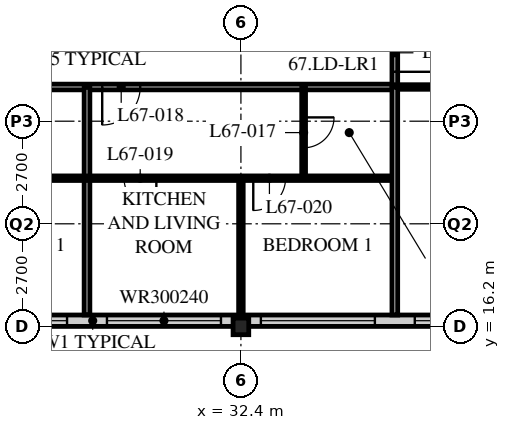
"""IFC4 building model, lengths in metres.
Left out: names, types, materials, properties, quantities, classifications, styles, units other than length and angle.
Written with IfcOpenShell. Run it as: python <this file> out.ifc"""

import sys

from ifc_helpers import new_model, si_unit, direction, frame, frame_2d, origin, origin_2d, place, context, subcontext, project, spatial, rectangle, i_section, extrude, element, fill, save


model = new_model("IFC4")
c1 = context("Model", 3, precision=1e-05, world=origin(), true_north=direction((0.0, 1.0)))
c2 = subcontext(c1, "Body", "Model", "MODEL_VIEW")
j1 = project(units=[si_unit("LENGTHUNIT", "METRE"), si_unit("PLANEANGLEUNIT", "RADIAN")], contexts=[c1])
p1 = place(None, origin())
s1 = spatial("IfcSite", under=j1, at=p1, CompositionType="ELEMENT")
p2 = place(p1, origin())
s2 = spatial("IfcBuilding", under=s1, at=p2, CompositionType="ELEMENT")
p3 = place(p2, frame((0.0, 0.0, 261.9)))
s3 = spatial("IfcBuildingStorey", under=s2, at=p3, CompositionType="ELEMENT", Elevation=261.9)
p4 = place(p3, frame((32.4, 16.2, 0.0), z_axis=(0.0, 0.0, 1.0), x_axis=(1.0, 0.0, 0.0)))
e1 = element("IfcColumn", 1, at=p4, inside=s3, PredefinedType="COLUMN", context=c2, shape_type="SweptSolid", body=[
    extrude(i_section(OverallWidth=0.412, OverallDepth=0.437, WebThickness=0.036, FlangeThickness=0.058, FilletRadius=0.015, at=origin_2d()), origin(), (0.0, 0.0, 1.0), 3.9),
])
p5 = place(p3, frame((8.4, 16.35, 0.0), z_axis=(0.0, 0.0, 1.0), x_axis=(1.0, 0.0, 0.0)))
e2 = element("IfcWall", 2, at=p5, inside=s3, PredefinedType="SOLIDWALL", context=c2, shape_type="SweptSolid", body=[
    extrude(rectangle(XDim=40.2, YDim=0.3, at=frame_2d((20.1, 0.0))), origin(), (0.0, 0.0, 1.0), 3.69),
])
p6 = place(p5, frame((0.225, 0.0, 0.6)))
e3 = element("IfcOpeningElement", 3, at=p6, cuts=e2, PredefinedType="OPENING", context=c2, shape_type="SweptSolid", body=[
    extrude(rectangle(XDim=3.0, YDim=2.4, at=frame_2d((1.5, 1.2))), frame((0.0, 0.16, 0.0), z_axis=(0.0, -1.0, 0.0), x_axis=(1.0, 0.0, 0.0)), (0.0, 0.0, 1.0), 0.32),
])
p7 = place(p5, frame((4.275, 0.0, 0.6)))
e4 = element("IfcOpeningElement", 4, at=p7, cuts=e2, PredefinedType="OPENING", context=c2, shape_type="SweptSolid", body=[
    extrude(rectangle(XDim=3.0, YDim=2.4, at=frame_2d((1.5, 1.2))), frame((0.0, 0.16, 0.0), z_axis=(0.0, -1.0, 0.0), x_axis=(1.0, 0.0, 0.0)), (0.0, 0.0, 1.0), 0.32),
])
p8 = place(p5, frame((8.325, 0.0, 0.6)))
e5 = element("IfcOpeningElement", 5, at=p8, cuts=e2, PredefinedType="OPENING", context=c2, shape_type="SweptSolid", body=[
    extrude(rectangle(XDim=3.0, YDim=2.4, at=frame_2d((1.5, 1.2))), frame((0.0, 0.16, 0.0), z_axis=(0.0, -1.0, 0.0), x_axis=(1.0, 0.0, 0.0)), (0.0, 0.0, 1.0), 0.32),
])
p9 = place(p5, frame((12.375, 0.0, 0.6)))
e6 = element("IfcOpeningElement", 6, at=p9, cuts=e2, PredefinedType="OPENING", context=c2, shape_type="SweptSolid", body=[
    extrude(rectangle(XDim=3.0, YDim=2.4, at=frame_2d((1.5, 1.2))), frame((0.0, 0.16, 0.0), z_axis=(0.0, -1.0, 0.0), x_axis=(1.0, 0.0, 0.0)), (0.0, 0.0, 1.0), 0.32),
])
p10 = place(p5, frame((16.425, 0.0, 0.6)))
e7 = element("IfcOpeningElement", 7, at=p10, cuts=e2, PredefinedType="OPENING", context=c2, shape_type="SweptSolid", body=[
    extrude(rectangle(XDim=3.0, YDim=2.4, at=frame_2d((1.5, 1.2))), frame((0.0, 0.16, 0.0), z_axis=(0.0, -1.0, 0.0), x_axis=(1.0, 0.0, 0.0)), (0.0, 0.0, 1.0), 0.32),
])
p11 = place(p5, frame((20.475, 0.0, 0.6)))
e8 = element("IfcOpeningElement", 8, at=p11, cuts=e2, PredefinedType="OPENING", context=c2, shape_type="SweptSolid", body=[
    extrude(rectangle(XDim=3.0, YDim=2.4, at=frame_2d((1.5, 1.2))), frame((0.0, 0.16, 0.0), z_axis=(0.0, -1.0, 0.0), x_axis=(1.0, 0.0, 0.0)), (0.0, 0.0, 1.0), 0.32),
])
p12 = place(p5, frame((24.525, 0.0, 0.6)))
e9 = element("IfcOpeningElement", 9, at=p12, cuts=e2, PredefinedType="OPENING", context=c2, shape_type="SweptSolid", body=[
    extrude(rectangle(XDim=3.0, YDim=2.4, at=frame_2d((1.5, 1.2))), frame((0.0, 0.16, 0.0), z_axis=(0.0, -1.0, 0.0), x_axis=(1.0, 0.0, 0.0)), (0.0, 0.0, 1.0), 0.32),
])
p13 = place(p5, frame((28.575, 0.0, 0.6)))
e10 = element("IfcOpeningElement", 10, at=p13, cuts=e2, PredefinedType="OPENING", context=c2, shape_type="SweptSolid", body=[
    extrude(rectangle(XDim=3.0, YDim=2.4, at=frame_2d((1.5, 1.2))), frame((0.0, 0.16, 0.0), z_axis=(0.0, -1.0, 0.0), x_axis=(1.0, 0.0, 0.0)), (0.0, 0.0, 1.0), 0.32),
])
p14 = place(p5, frame((32.625, 0.0, 0.6)))
e11 = element("IfcOpeningElement", 11, at=p14, cuts=e2, PredefinedType="OPENING", context=c2, shape_type="SweptSolid", body=[
    extrude(rectangle(XDim=3.0, YDim=2.4, at=frame_2d((1.5, 1.2))), frame((0.0, 0.16, 0.0), z_axis=(0.0, -1.0, 0.0), x_axis=(1.0, 0.0, 0.0)), (0.0, 0.0, 1.0), 0.32),
])
p15 = place(p5, frame((36.675, 0.0, 0.6)))
e12 = element("IfcOpeningElement", 12, at=p15, cuts=e2, PredefinedType="OPENING", context=c2, shape_type="SweptSolid", body=[
    extrude(rectangle(XDim=3.0, YDim=2.4, at=frame_2d((1.5, 1.2))), frame((0.0, 0.16, 0.0), z_axis=(0.0, -1.0, 0.0), x_axis=(1.0, 0.0, 0.0)), (0.0, 0.0, 1.0), 0.32),
])
p16 = place(p3, frame((8.1, 22.5, 0.0), z_axis=(0.0, 0.0, 1.0), x_axis=(1.0, 0.0, 0.0)))
e13 = element("IfcWall", 13, at=p16, inside=s3, PredefinedType="PARTITIONING", context=c2, shape_type="SweptSolid", body=[
    extrude(rectangle(XDim=28.35, YDim=0.15, at=frame_2d((14.175, 0.0))), origin(), (0.0, 0.0, 1.0), 3.69),
])
p17 = place(p16, frame((4.45, 0.0, 0.0)))
e14 = element("IfcOpeningElement", 14, at=p17, cuts=e13, PredefinedType="OPENING", context=c2, shape_type="SweptSolid", body=[
    extrude(rectangle(XDim=1.0, YDim=2.1, at=frame_2d((0.5, 1.05))), frame((0.0, 0.085, 0.0), z_axis=(0.0, -1.0, 0.0), x_axis=(1.0, 0.0, 0.0)), (0.0, 0.0, 1.0), 0.17),
])
p18 = place(p16, frame((12.55, 0.0, 0.0)))
e15 = element("IfcOpeningElement", 15, at=p18, cuts=e13, PredefinedType="OPENING", context=c2, shape_type="SweptSolid", body=[
    extrude(rectangle(XDim=1.0, YDim=2.1, at=frame_2d((0.5, 1.05))), frame((0.0, 0.085, 0.0), z_axis=(0.0, -1.0, 0.0), x_axis=(1.0, 0.0, 0.0)), (0.0, 0.0, 1.0), 0.17),
])
p19 = place(p16, frame((20.65, 0.0, 0.0)))
e16 = element("IfcOpeningElement", 16, at=p19, cuts=e13, PredefinedType="OPENING", context=c2, shape_type="SweptSolid", body=[
    extrude(rectangle(XDim=1.0, YDim=2.1, at=frame_2d((0.5, 1.05))), frame((0.0, 0.085, 0.0), z_axis=(0.0, -1.0, 0.0), x_axis=(1.0, 0.0, 0.0)), (0.0, 0.0, 1.0), 0.17),
])
p20 = place(p16, frame((2.625, 0.0, 0.0)))
e17 = element("IfcOpeningElement", 17, at=p20, cuts=e13, PredefinedType="OPENING", context=c2, shape_type="SweptSolid", body=[
    extrude(rectangle(XDim=1.0, YDim=2.1, at=frame_2d((0.5, 1.05))), frame((0.0, 0.085, 0.0), z_axis=(0.0, -1.0, 0.0), x_axis=(1.0, 0.0, 0.0)), (0.0, 0.0, 1.0), 0.17),
])
p21 = place(p3, frame((36.45, 22.5, 0.0), z_axis=(0.0, 0.0, 1.0), x_axis=(0.0, 1.0, 0.0)))
e18 = element("IfcWall", 18, at=p21, inside=s3, PredefinedType="PARTITIONING", context=c2, shape_type="SweptSolid", body=[
    extrude(rectangle(XDim=1.8, YDim=0.15, at=frame_2d((0.9, 0.0))), origin(), (0.0, 0.0, 1.0), 3.69),
])
p22 = place(p21, frame((0.4, 0.0, 0.0)))
e19 = element("IfcOpeningElement", 19, at=p22, cuts=e18, PredefinedType="OPENING", context=c2, shape_type="SweptSolid", body=[
    extrude(rectangle(XDim=1.0, YDim=2.1, at=frame_2d((0.5, 1.05))), frame((0.0, 0.085, 0.0), z_axis=(0.0, -1.0, 0.0), x_axis=(1.0, 0.0, 0.0)), (0.0, 0.0, 1.0), 0.17),
])
p23 = place(p3, frame((28.35, 22.5, 0.0), z_axis=(0.0, 0.0, 1.0), x_axis=(0.0, -1.0, 0.0)))
e20 = element("IfcWall", 20, at=p23, inside=s3, PredefinedType="PARTITIONING", context=c2, shape_type="SweptSolid", body=[
    extrude(rectangle(XDim=6.0, YDim=0.15, at=frame_2d((3.0, 0.0))), origin(), (0.0, 0.0, 1.0), 3.69),
])
p24 = place(p3, frame((34.05, 22.5, 0.0), z_axis=(0.0, 0.0, 1.0), x_axis=(0.0, -1.0, 0.0)))
e21 = element("IfcWall", 21, at=p24, inside=s3, PredefinedType="PARTITIONING", context=c2, shape_type="SweptSolid", body=[
    extrude(rectangle(XDim=2.4, YDim=0.1, at=frame_2d((1.2, 0.0))), origin(), (0.0, 0.0, 1.0), 3.69),
])
p25 = place(p24, frame((0.8, 0.0, 0.0)))
e22 = element("IfcOpeningElement", 22, at=p25, cuts=e21, PredefinedType="OPENING", context=c2, shape_type="SweptSolid", body=[
    extrude(rectangle(XDim=0.8, YDim=2.1, at=frame_2d((0.4, 1.05))), frame((0.0, 0.06, 0.0), z_axis=(0.0, -1.0, 0.0), x_axis=(1.0, 0.0, 0.0)), (0.0, 0.0, 1.0), 0.12),
])
p26 = place(p3, frame((32.4, 20.1, 0.0), z_axis=(0.0, 0.0, 1.0), x_axis=(0.0, -1.0, 0.0)))
e23 = element("IfcWall", 23, at=p26, inside=s3, PredefinedType="PARTITIONING", context=c2, shape_type="SweptSolid", body=[
    extrude(rectangle(XDim=3.6, YDim=0.12, at=frame_2d((1.8, 0.0))), origin(), (0.0, 0.0, 1.0), 3.078),
])
p27 = place(p3, frame((8.1, 20.1, 0.0), z_axis=(0.0, 0.0, 1.0), x_axis=(1.0, 0.0, 0.0)))
e24 = element("IfcWall", 24, at=p27, inside=s3, PredefinedType="PARTITIONING", context=c2, shape_type="SweptSolid", body=[
    extrude(rectangle(XDim=28.35, YDim=0.12, at=frame_2d((14.175, 0.0))), origin(), (0.0, 0.0, 1.0), 3.69),
])
p28 = place(p27, frame((5.025, 0.0, 0.0)))
e25 = element("IfcOpeningElement", 25, at=p28, cuts=e24, PredefinedType="OPENING", context=c2, shape_type="SweptSolid", body=[
    extrude(rectangle(XDim=0.85, YDim=2.1, at=frame_2d((0.425, 1.05))), frame((0.0, 0.07, 0.0), z_axis=(0.0, -1.0, 0.0), x_axis=(1.0, 0.0, 0.0)), (0.0, 0.0, 1.0), 0.14),
])
p29 = place(p27, frame((8.425, 0.0, 0.0)))
e26 = element("IfcOpeningElement", 26, at=p29, cuts=e24, PredefinedType="OPENING", context=c2, shape_type="SweptSolid", body=[
    extrude(rectangle(XDim=0.85, YDim=2.1, at=frame_2d((0.425, 1.05))), frame((0.0, 0.07, 0.0), z_axis=(0.0, -1.0, 0.0), x_axis=(1.0, 0.0, 0.0)), (0.0, 0.0, 1.0), 0.14),
])
p30 = place(p27, frame((13.125, 0.0, 0.0)))
e27 = element("IfcOpeningElement", 27, at=p30, cuts=e24, PredefinedType="OPENING", context=c2, shape_type="SweptSolid", body=[
    extrude(rectangle(XDim=0.85, YDim=2.1, at=frame_2d((0.425, 1.05))), frame((0.0, 0.07, 0.0), z_axis=(0.0, -1.0, 0.0), x_axis=(1.0, 0.0, 0.0)), (0.0, 0.0, 1.0), 0.14),
])
p31 = place(p27, frame((16.525, 0.0, 0.0)))
e28 = element("IfcOpeningElement", 28, at=p31, cuts=e24, PredefinedType="OPENING", context=c2, shape_type="SweptSolid", body=[
    extrude(rectangle(XDim=0.85, YDim=2.1, at=frame_2d((0.425, 1.05))), frame((0.0, 0.07, 0.0), z_axis=(0.0, -1.0, 0.0), x_axis=(1.0, 0.0, 0.0)), (0.0, 0.0, 1.0), 0.14),
])
p32 = place(p27, frame((21.225, 0.0, 0.0)))
e29 = element("IfcOpeningElement", 29, at=p32, cuts=e24, PredefinedType="OPENING", context=c2, shape_type="SweptSolid", body=[
    extrude(rectangle(XDim=0.85, YDim=2.1, at=frame_2d((0.425, 1.05))), frame((0.0, 0.07, 0.0), z_axis=(0.0, -1.0, 0.0), x_axis=(1.0, 0.0, 0.0)), (0.0, 0.0, 1.0), 0.14),
])
p33 = place(p27, frame((24.625, 0.0, 0.0)))
e30 = element("IfcOpeningElement", 30, at=p33, cuts=e24, PredefinedType="OPENING", context=c2, shape_type="SweptSolid", body=[
    extrude(rectangle(XDim=0.85, YDim=2.1, at=frame_2d((0.425, 1.05))), frame((0.0, 0.07, 0.0), z_axis=(0.0, -1.0, 0.0), x_axis=(1.0, 0.0, 0.0)), (0.0, 0.0, 1.0), 0.14),
])
p34 = place(p27, frame((2.725, 0.0, 0.0)))
e31 = element("IfcOpeningElement", 31, at=p34, cuts=e24, PredefinedType="OPENING", context=c2, shape_type="SweptSolid", body=[
    extrude(rectangle(XDim=0.85, YDim=2.1, at=frame_2d((0.425, 1.05))), frame((0.0, 0.07, 0.0), z_axis=(0.0, -1.0, 0.0), x_axis=(1.0, 0.0, 0.0)), (0.0, 0.0, 1.0), 0.14),
])
p35 = place(p3, frame((36.45, 22.5, 0.0), z_axis=(0.0, 0.0, 1.0), x_axis=(1.0, 0.0, 0.0)))
e32 = element("IfcWall", 32, at=p35, inside=s3, PredefinedType="PARTITIONING", context=c2, shape_type="SweptSolid", body=[
    extrude(rectangle(XDim=6.45, YDim=0.12, at=frame_2d((3.225, 0.0))), origin(), (0.0, 0.0, 1.0), 3.69),
])
p36 = place(p35, frame((2.8, 0.0, 0.0)))
e33 = element("IfcOpeningElement", 33, at=p36, cuts=e32, PredefinedType="OPENING", context=c2, shape_type="SweptSolid", body=[
    extrude(rectangle(XDim=0.85, YDim=2.1, at=frame_2d((0.425, 1.05))), frame((0.0, 0.07, 0.0), z_axis=(0.0, -1.0, 0.0), x_axis=(1.0, 0.0, 0.0)), (0.0, 0.0, 1.0), 0.14),
])
p37 = place(p3, frame((36.45, 16.5, 0.0), z_axis=(0.0, 0.0, 1.0), x_axis=(0.0, 1.0, 0.0)))
e34 = element("IfcWall", 34, at=p37, inside=s3, PredefinedType="PARTITIONING", context=c2, shape_type="SweptSolid", body=[
    extrude(rectangle(XDim=6.0, YDim=0.15, at=frame_2d((3.0, 0.0))), origin(), (0.0, 0.0, 1.0), 3.69),
])
p38 = place(p10, origin())
e35 = element("IfcWindow", 35, at=p38, inside=s3, PartitioningType="SINGLE_PANEL", PredefinedType="WINDOW", context=c2, shape_type="SweptSolid", body=[
    extrude(rectangle(XDim=3.0, YDim=2.4, at=frame_2d((1.5, 1.2))), frame((0.0, 0.03, 0.0), z_axis=(0.0, -1.0, 0.0), x_axis=(1.0, 0.0, 0.0)), (0.0, 0.0, 1.0), 0.06),
])
fill(e7, e35)
p39 = place(p11, origin())
e36 = element("IfcWindow", 36, at=p39, inside=s3, PartitioningType="SINGLE_PANEL", PredefinedType="WINDOW", context=c2, shape_type="SweptSolid", body=[
    extrude(rectangle(XDim=3.0, YDim=2.4, at=frame_2d((1.5, 1.2))), frame((0.0, 0.03, 0.0), z_axis=(0.0, -1.0, 0.0), x_axis=(1.0, 0.0, 0.0)), (0.0, 0.0, 1.0), 0.06),
])
fill(e8, e36)
p40 = place(p12, origin())
e37 = element("IfcWindow", 37, at=p40, inside=s3, PartitioningType="SINGLE_PANEL", PredefinedType="WINDOW", context=c2, shape_type="SweptSolid", body=[
    extrude(rectangle(XDim=3.0, YDim=2.4, at=frame_2d((1.5, 1.2))), frame((0.0, 0.03, 0.0), z_axis=(0.0, -1.0, 0.0), x_axis=(1.0, 0.0, 0.0)), (0.0, 0.0, 1.0), 0.06),
])
fill(e9, e37)
p41 = place(p13, origin())
e38 = element("IfcWindow", 38, at=p41, inside=s3, PartitioningType="SINGLE_PANEL", PredefinedType="WINDOW", context=c2, shape_type="SweptSolid", body=[
    extrude(rectangle(XDim=3.0, YDim=2.4, at=frame_2d((1.5, 1.2))), frame((0.0, 0.03, 0.0), z_axis=(0.0, -1.0, 0.0), x_axis=(1.0, 0.0, 0.0)), (0.0, 0.0, 1.0), 0.06),
])
fill(e10, e38)
p42 = place(p25, origin())
e39 = element("IfcDoor", 39, at=p42, inside=s3, OperationType="SINGLE_SWING_LEFT", PredefinedType="DOOR", context=c2, shape_type="SweptSolid", body=[
    extrude(rectangle(XDim=0.8, YDim=2.1, at=frame_2d((0.4, 1.05))), frame((0.0, 0.025, 0.0), z_axis=(0.0, -1.0, 0.0), x_axis=(1.0, 0.0, 0.0)), (0.0, 0.0, 1.0), 0.05),
])
fill(e22, e39)
p43 = place(p19, origin())
e40 = element("IfcDoor", 40, at=p43, inside=s3, OperationType="SINGLE_SWING_RIGHT", PredefinedType="DOOR", context=c2, shape_type="SweptSolid", body=[
    extrude(rectangle(XDim=1.0, YDim=2.1, at=frame_2d((0.5, 1.05))), frame((0.0, 0.025, 0.0), z_axis=(0.0, -1.0, 0.0), x_axis=(1.0, 0.0, 0.0)), (0.0, 0.0, 1.0), 0.05),
])
fill(e16, e40)
p44 = place(p32, origin())
e41 = element("IfcDoor", 41, at=p44, inside=s3, OperationType="SINGLE_SWING_LEFT", PredefinedType="DOOR", context=c2, shape_type="SweptSolid", body=[
    extrude(rectangle(XDim=0.85, YDim=2.1, at=frame_2d((0.425, 1.05))), frame((0.0, 0.025, 0.0), z_axis=(0.0, -1.0, 0.0), x_axis=(1.0, 0.0, 0.0)), (0.0, 0.0, 1.0), 0.05),
])
fill(e29, e41)
p45 = place(p33, origin())
e42 = element("IfcDoor", 42, at=p45, inside=s3, OperationType="SINGLE_SWING_RIGHT", PredefinedType="DOOR", context=c2, shape_type="SweptSolid", body=[
    extrude(rectangle(XDim=0.85, YDim=2.1, at=frame_2d((0.425, 1.05))), frame((0.0, 0.025, 0.0), z_axis=(0.0, -1.0, 0.0), x_axis=(1.0, 0.0, 0.0)), (0.0, 0.0, 1.0), 0.05),
])
fill(e30, e42)
p46 = place(p22, origin())
e43 = element("IfcDoor", 43, at=p46, inside=s3, OperationType="SINGLE_SWING_RIGHT", PredefinedType="DOOR", context=c2, shape_type="SweptSolid", body=[
    extrude(rectangle(XDim=1.0, YDim=2.1, at=frame_2d((0.5, 1.05))), frame((0.0, 0.025, 0.0), z_axis=(0.0, -1.0, 0.0), x_axis=(1.0, 0.0, 0.0)), (0.0, 0.0, 1.0), 0.05),
])
fill(e19, e43)
save(model, sys.argv[1])
